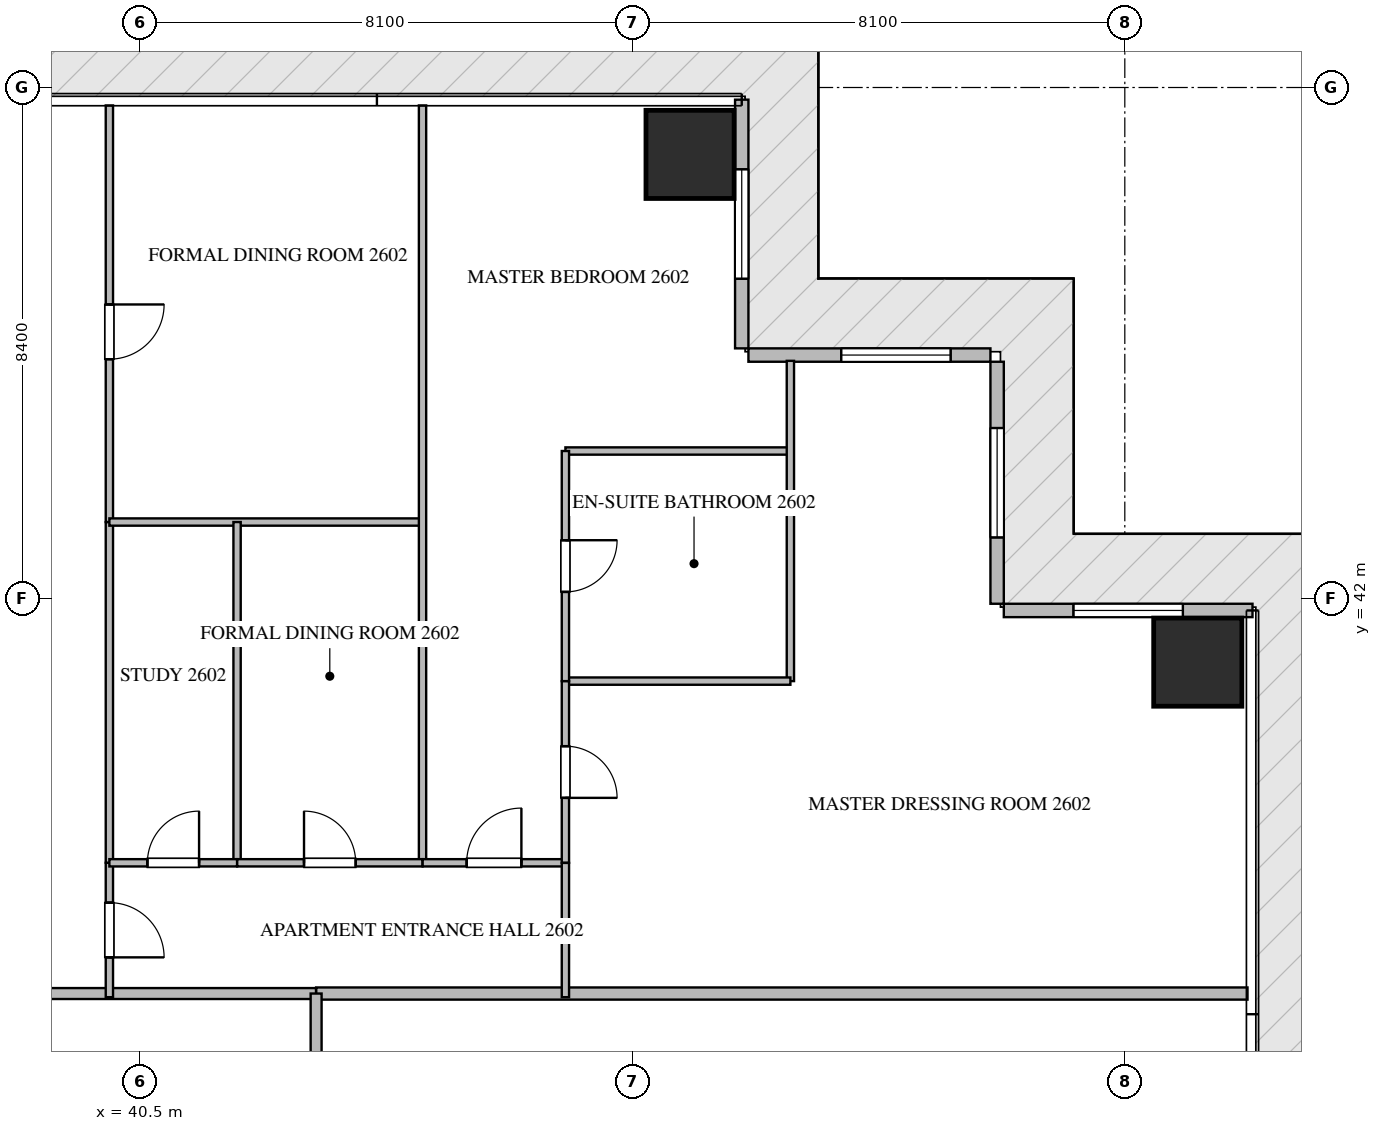
"""IFC4 building model, lengths in metres.
Left out: names, types, materials, properties, quantities, classifications, styles, units other than length and angle.
Written with IfcOpenShell. Run it as: python <this file> out.ifc"""

import sys

from ifc_helpers import new_model, si_unit, direction, frame, frame_2d, origin, origin_2d, place, context, subcontext, project, spatial, rectangle, extrude, source, transform, mapped, element, fill, save


model = new_model("IFC4")
c1 = context("Model", 3, precision=1e-05, world=origin(), true_north=direction((0.0, 1.0)))
c2 = subcontext(c1, "Body", "Model", "MODEL_VIEW")
j1 = project(units=[si_unit("LENGTHUNIT", "METRE"), si_unit("PLANEANGLEUNIT", "RADIAN")], contexts=[c1])
p1 = place(None, origin())
s1 = spatial("IfcSite", under=j1, at=p1, CompositionType="ELEMENT")
p2 = place(p1, origin())
s2 = spatial("IfcBuilding", under=s1, at=p2, CompositionType="ELEMENT")
p3 = place(p2, frame((0.0, 0.0, 105.45)))
s3 = spatial("IfcBuildingStorey", under=s2, at=p3, CompositionType="ELEMENT", Elevation=105.45)
m1 = source(origin(), c2, "Body", "SweptSolid", [
    extrude(rectangle(XDim=1.45, YDim=1.45, at=origin_2d()), origin(), (0.0, 0.0, 1.0), 3.65),
])
for number, where, z_axis, x_axis in (
    (1, (49.55, 49.3, -0.26), (0.0, 0.0, 1.0), (1.0, 0.0, 0.0)),
    (2, (57.9, 40.95, -0.26), (0.0, 0.0, 1.0), (1.0, 0.0, 0.0)),
):
    element("IfcColumn", number, at=place(p3, frame(where, z_axis=z_axis, x_axis=x_axis)), inside=s3, PredefinedType="COLUMN", context=c2, shape_type="MappedRepresentation", body=[
        mapped(m1, transform((0.0, 0.0, 0.0), scale=1.0)),
    ])
p4 = place(p3, frame((58.8, 41.8, 0.0), z_axis=(0.0, 0.0, 1.0), x_axis=(-1.0, 0.0, 0.0)))
e3 = element("IfcWall", 3, at=p4, inside=s3, PredefinedType="ELEMENTEDWALL", context=c2, shape_type="SweptSolid", body=[
    extrude(rectangle(XDim=4.09, YDim=0.22, at=frame_2d((2.045, 0.0))), origin(), (0.0, 0.0, 1.0), 3.375),
])
p5 = place(p4, frame((1.145, 0.0, 0.65)))
e4 = element("IfcOpeningElement", 4, at=p5, cuts=e3, PredefinedType="OPENING", context=c2, shape_type="SweptSolid", body=[
    extrude(rectangle(XDim=1.8, YDim=2.1, at=frame_2d((0.9, 1.05))), frame((0.0, 0.12, 0.0), z_axis=(0.0, -1.0, 0.0), x_axis=(1.0, 0.0, 0.0)), (0.0, 0.0, 1.0), 0.24),
])
p6 = place(p3, frame((54.6, 41.91, 0.0), z_axis=(0.0, 0.0, 1.0), x_axis=(0.0, 1.0, 0.0)))
e5 = element("IfcWall", 5, at=p6, inside=s3, PredefinedType="ELEMENTEDWALL", context=c2, shape_type="SweptSolid", body=[
    extrude(rectangle(XDim=3.98, YDim=0.22, at=frame_2d((1.99, 0.0))), origin(), (0.0, 0.0, 1.0), 3.375),
])
p7 = place(p6, frame((1.09, 0.0, 0.65)))
e6 = element("IfcOpeningElement", 6, at=p7, cuts=e5, PredefinedType="OPENING", context=c2, shape_type="SweptSolid", body=[
    extrude(rectangle(XDim=1.8, YDim=2.1, at=frame_2d((0.9, 1.05))), frame((0.0, 0.12, 0.0), z_axis=(0.0, -1.0, 0.0), x_axis=(1.0, 0.0, 0.0)), (0.0, 0.0, 1.0), 0.24),
])
p8 = place(p3, frame((54.49, 46.0, 0.0), z_axis=(0.0, 0.0, 1.0), x_axis=(-1.0, 0.0, 0.0)))
e7 = element("IfcWall", 7, at=p8, inside=s3, PredefinedType="ELEMENTEDWALL", context=c2, shape_type="SweptSolid", body=[
    extrude(rectangle(XDim=3.98, YDim=0.22, at=frame_2d((1.99, 0.0))), origin(), (0.0, 0.0, 1.0), 3.375),
])
p9 = place(p8, frame((0.654, 0.0, 0.65)))
e8 = element("IfcOpeningElement", 8, at=p9, cuts=e7, PredefinedType="OPENING", context=c2, shape_type="SweptSolid", body=[
    extrude(rectangle(XDim=1.8, YDim=2.1, at=frame_2d((0.9, 1.05))), frame((0.0, 0.12, 0.0), z_axis=(0.0, -1.0, 0.0), x_axis=(1.0, 0.0, 0.0)), (0.0, 0.0, 1.0), 0.24),
])
p10 = place(p3, frame((50.4, 46.11, 0.0), z_axis=(0.0, 0.0, 1.0), x_axis=(0.0, 1.0, 0.0)))
e9 = element("IfcWall", 9, at=p10, inside=s3, PredefinedType="ELEMENTEDWALL", context=c2, shape_type="SweptSolid", body=[
    extrude(rectangle(XDim=4.09, YDim=0.22, at=frame_2d((2.045, 0.0))), origin(), (0.0, 0.0, 1.0), 3.375),
])
p11 = place(p10, frame((1.145, 0.0, 0.65)))
e10 = element("IfcOpeningElement", 10, at=p11, cuts=e9, PredefinedType="OPENING", context=c2, shape_type="SweptSolid", body=[
    extrude(rectangle(XDim=1.8, YDim=2.1, at=frame_2d((0.9, 1.05))), frame((0.0, 0.12, 0.0), z_axis=(0.0, -1.0, 0.0), x_axis=(1.0, 0.0, 0.0)), (0.0, 0.0, 1.0), 0.24),
])
p12 = place(p3, frame((43.4, 35.5, 0.0), z_axis=(0.0, 0.0, 1.0), x_axis=(1.0, 0.0, 0.0)))
e11 = element("IfcWall", 11, at=p12, inside=s3, PredefinedType="PARTITIONING", context=c2, shape_type="SweptSolid", body=[
    extrude(rectangle(XDim=15.318, YDim=0.2, at=frame_2d((7.659, 0.0))), origin(), (0.0, 0.0, 1.0), 3.39),
])
p13 = place(p3, frame((21.402, 35.5, 0.0), z_axis=(0.0, 0.0, 1.0), x_axis=(1.0, 0.0, 0.0)))
e12 = element("IfcWall", 12, at=p13, inside=s3, PredefinedType="PARTITIONING", context=c2, shape_type="SweptSolid", body=[
    extrude(rectangle(XDim=21.996, YDim=0.18, at=frame_2d((10.998, 0.0))), origin(), (0.0, 0.0, 1.0), 3.39),
])
p14 = place(p13, frame((15.222, 0.0, 0.0)))
e13 = element("IfcOpeningElement", 13, at=p14, cuts=e12, PredefinedType="OPENING", context=c2, shape_type="SweptSolid", body=[
    extrude(rectangle(XDim=1.0, YDim=2.15, at=frame_2d((0.5, 1.075))), frame((0.0, 0.1, 0.0), z_axis=(0.0, -1.0, 0.0), x_axis=(1.0, 0.0, 0.0)), (0.0, 0.0, 1.0), 0.2),
])
p15 = place(p3, frame((43.4, 14.9, 0.0), z_axis=(0.0, 0.0, 1.0), x_axis=(0.0, 1.0, 0.0)))
e14 = element("IfcWall", 14, at=p15, inside=s3, PredefinedType="PARTITIONING", context=c2, shape_type="SweptSolid", body=[
    extrude(rectangle(XDim=20.6, YDim=0.18, at=frame_2d((10.3, 0.0))), origin(), (0.0, 0.0, 1.0), 3.39),
])
p16 = place(p15, frame((1.82, 0.0, 0.0)))
e15 = element("IfcOpeningElement", 15, at=p16, cuts=e14, PredefinedType="OPENING", context=c2, shape_type="SweptSolid", body=[
    extrude(rectangle(XDim=1.0, YDim=2.15, at=frame_2d((0.5, 1.075))), frame((0.0, 0.1, 0.0), z_axis=(0.0, -1.0, 0.0), x_axis=(1.0, 0.0, 0.0)), (0.0, 0.0, 1.0), 0.2),
])
p17 = place(p15, frame((11.27, 0.0, 0.0)))
e16 = element("IfcOpeningElement", 16, at=p17, cuts=e14, PredefinedType="OPENING", context=c2, shape_type="SweptSolid", body=[
    extrude(rectangle(XDim=1.0, YDim=2.15, at=frame_2d((0.5, 1.075))), frame((0.0, 0.1, 0.0), z_axis=(0.0, -1.0, 0.0), x_axis=(1.0, 0.0, 0.0)), (0.0, 0.0, 1.0), 0.2),
])
p18 = place(p15, frame((17.92, 0.0, 0.0)))
e17 = element("IfcOpeningElement", 17, at=p18, cuts=e14, PredefinedType="OPENING", context=c2, shape_type="SweptSolid", body=[
    extrude(rectangle(XDim=1.0, YDim=2.15, at=frame_2d((0.5, 1.075))), frame((0.0, 0.1, 0.0), z_axis=(0.0, -1.0, 0.0), x_axis=(1.0, 0.0, 0.0)), (0.0, 0.0, 1.0), 0.2),
])
p19 = place(p3, frame((40.0, 37.65, 0.0), z_axis=(0.0, 0.0, 1.0), x_axis=(0.0, -1.0, 0.0)))
e18 = element("IfcWall", 18, at=p19, inside=s3, PredefinedType="PARTITIONING", context=c2, shape_type="SweptSolid", body=[
    extrude(rectangle(XDim=2.21, YDim=0.12, at=frame_2d((1.105, 0.0))), origin(), (0.0, 0.0, 1.0), 3.39),
])
p20 = place(p19, frame((0.655, 0.0, 0.0)))
e19 = element("IfcOpeningElement", 19, at=p20, cuts=e18, PredefinedType="OPENING", context=c2, shape_type="SweptSolid", body=[
    extrude(rectangle(XDim=0.9, YDim=2.1, at=frame_2d((0.45, 1.05))), frame((0.0, 0.07, 0.0), z_axis=(0.0, -1.0, 0.0), x_axis=(1.0, 0.0, 0.0)), (0.0, 0.0, 1.0), 0.14),
])
p21 = place(p3, frame((40.0, 50.105, 0.0), z_axis=(0.0, 0.0, 1.0), x_axis=(0.0, -1.0, 0.0)))
e20 = element("IfcWall", 20, at=p21, inside=s3, PredefinedType="PARTITIONING", context=c2, shape_type="SweptSolid", body=[
    extrude(rectangle(XDim=6.851, YDim=0.12, at=frame_2d((3.426, 0.0))), origin(), (0.0, 0.0, 1.0), 3.39),
])
p22 = place(p21, frame((3.273, 0.0, 0.0)))
e21 = element("IfcOpeningElement", 21, at=p22, cuts=e20, PredefinedType="OPENING", context=c2, shape_type="SweptSolid", body=[
    extrude(rectangle(XDim=0.9, YDim=2.1, at=frame_2d((0.45, 1.05))), frame((0.0, 0.07, 0.0), z_axis=(0.0, -1.0, 0.0), x_axis=(1.0, 0.0, 0.0)), (0.0, 0.0, 1.0), 0.14),
])
p23 = place(p3, frame((40.0, 43.252, 0.0), z_axis=(0.0, 0.0, 1.0), x_axis=(0.0, -1.0, 0.0)))
e22 = element("IfcWall", 22, at=p23, inside=s3, PredefinedType="PARTITIONING", context=c2, shape_type="SweptSolid", body=[
    extrude(rectangle(XDim=5.6, YDim=0.12, at=frame_2d((2.8, 0.0))), origin(), (0.0, 0.0, 1.0), 3.39),
])
p24 = place(p3, frame((40.0, 43.254, 0.0), z_axis=(0.0, 0.0, 1.0), x_axis=(1.0, 0.0, 0.0)))
e23 = element("IfcWall", 23, at=p24, inside=s3, PredefinedType="PARTITIONING", context=c2, shape_type="SweptSolid", body=[
    extrude(rectangle(XDim=5.15, YDim=0.12, at=frame_2d((2.575, 0.0))), origin(), (0.0, 0.0, 1.0), 3.39),
])
p25 = place(p3, frame((45.15, 50.105, 0.0), z_axis=(0.0, 0.0, 1.0), x_axis=(0.0, -1.0, 0.0)))
e24 = element("IfcWall", 24, at=p25, inside=s3, PredefinedType="PARTITIONING", context=c2, shape_type="SweptSolid", body=[
    extrude(rectangle(XDim=12.455, YDim=0.12, at=frame_2d((6.228, 0.0))), origin(), (0.0, 0.0, 1.0), 3.39),
])
p26 = place(p3, frame((42.1, 43.254, 0.0), z_axis=(0.0, 0.0, 1.0), x_axis=(0.0, -1.0, 0.0)))
e25 = element("IfcWall", 25, at=p26, inside=s3, PredefinedType="PARTITIONING", context=c2, shape_type="SweptSolid", body=[
    extrude(rectangle(XDim=5.604, YDim=0.12, at=frame_2d((2.802, 0.0))), origin(), (0.0, 0.0, 1.0), 3.39),
])
p27 = place(p3, frame((40.0, 37.65, 0.0), z_axis=(0.0, 0.0, 1.0), x_axis=(1.0, 0.0, 0.0)))
e26 = element("IfcWall", 26, at=p27, inside=s3, PredefinedType="PARTITIONING", context=c2, shape_type="SweptSolid", body=[
    extrude(rectangle(XDim=2.1, YDim=0.12, at=frame_2d((1.05, 0.0))), origin(), (0.0, 0.0, 1.0), 3.39),
])
p28 = place(p27, frame((0.625, 0.0, 0.0)))
e27 = element("IfcOpeningElement", 27, at=p28, cuts=e26, PredefinedType="OPENING", context=c2, shape_type="SweptSolid", body=[
    extrude(rectangle(XDim=0.85, YDim=2.1, at=frame_2d((0.425, 1.05))), frame((0.0, 0.07, 0.0), z_axis=(0.0, -1.0, 0.0), x_axis=(1.0, 0.0, 0.0)), (0.0, 0.0, 1.0), 0.14),
])
p29 = place(p3, frame((42.102, 37.65, 0.0), z_axis=(0.0, 0.0, 1.0), x_axis=(1.0, 0.0, 0.0)))
e28 = element("IfcWall", 28, at=p29, inside=s3, PredefinedType="PARTITIONING", context=c2, shape_type="SweptSolid", body=[
    extrude(rectangle(XDim=3.048, YDim=0.12, at=frame_2d((1.524, 0.0))), origin(), (0.0, 0.0, 1.0), 3.39),
])
p30 = place(p29, frame((1.099, 0.0, 0.0)))
e29 = element("IfcOpeningElement", 29, at=p30, cuts=e28, PredefinedType="OPENING", context=c2, shape_type="SweptSolid", body=[
    extrude(rectangle(XDim=0.85, YDim=2.1, at=frame_2d((0.425, 1.05))), frame((0.0, 0.07, 0.0), z_axis=(0.0, -1.0, 0.0), x_axis=(1.0, 0.0, 0.0)), (0.0, 0.0, 1.0), 0.14),
])
p31 = place(p3, frame((45.152, 37.65, 0.0), z_axis=(0.0, 0.0, 1.0), x_axis=(1.0, 0.0, 0.0)))
e30 = element("IfcWall", 30, at=p31, inside=s3, PredefinedType="PARTITIONING", context=c2, shape_type="SweptSolid", body=[
    extrude(rectangle(XDim=2.348, YDim=0.12, at=frame_2d((1.174, 0.0))), origin(), (0.0, 0.0, 1.0), 3.39),
])
p32 = place(p31, frame((0.724, 0.0, 0.0)))
e31 = element("IfcOpeningElement", 31, at=p32, cuts=e30, PredefinedType="OPENING", context=c2, shape_type="SweptSolid", body=[
    extrude(rectangle(XDim=0.9, YDim=2.1, at=frame_2d((0.45, 1.05))), frame((0.0, 0.07, 0.0), z_axis=(0.0, -1.0, 0.0), x_axis=(1.0, 0.0, 0.0)), (0.0, 0.0, 1.0), 0.14),
])
p33 = place(p3, frame((47.5, 44.422, 0.0), z_axis=(0.0, 0.0, 1.0), x_axis=(1.0, 0.0, 0.0)))
e32 = element("IfcWall", 32, at=p33, inside=s3, PredefinedType="PARTITIONING", context=c2, shape_type="SweptSolid", body=[
    extrude(rectangle(XDim=3.7, YDim=0.12, at=frame_2d((1.85, 0.0))), origin(), (0.0, 0.0, 1.0), 3.39),
])
p34 = place(p3, frame((51.2, 45.905, 0.0), z_axis=(0.0, 0.0, 1.0), x_axis=(0.0, -1.0, 0.0)))
e33 = element("IfcWall", 33, at=p34, inside=s3, PredefinedType="PARTITIONING", context=c2, shape_type="SweptSolid", body=[
    extrude(rectangle(XDim=5.267, YDim=0.12, at=frame_2d((2.634, 0.0))), origin(), (0.0, 0.0, 1.0), 3.39),
])
p35 = place(p3, frame((47.5, 40.638, 0.0), z_axis=(0.0, 0.0, 1.0), x_axis=(1.0, 0.0, 0.0)))
e34 = element("IfcWall", 34, at=p35, inside=s3, PredefinedType="PARTITIONING", context=c2, shape_type="SweptSolid", body=[
    extrude(rectangle(XDim=3.7, YDim=0.12, at=frame_2d((1.85, 0.0))), origin(), (0.0, 0.0, 1.0), 3.39),
])
p36 = place(p3, frame((47.5, 44.422, 0.0), z_axis=(0.0, 0.0, 1.0), x_axis=(0.0, -1.0, 0.0)))
e35 = element("IfcWall", 35, at=p36, inside=s3, PredefinedType="PARTITIONING", context=c2, shape_type="SweptSolid", body=[
    extrude(rectangle(XDim=3.784, YDim=0.12, at=frame_2d((1.892, 0.0))), origin(), (0.0, 0.0, 1.0), 3.39),
])
p37 = place(p36, frame((1.467, 0.0, 0.0)))
e36 = element("IfcOpeningElement", 36, at=p37, cuts=e35, PredefinedType="OPENING", context=c2, shape_type="SweptSolid", body=[
    extrude(rectangle(XDim=0.85, YDim=2.1, at=frame_2d((0.425, 1.05))), frame((0.0, 0.07, 0.0), z_axis=(0.0, -1.0, 0.0), x_axis=(1.0, 0.0, 0.0)), (0.0, 0.0, 1.0), 0.14),
])
p38 = place(p3, frame((47.5, 40.636, 0.0), z_axis=(0.0, 0.0, 1.0), x_axis=(0.0, -1.0, 0.0)))
e37 = element("IfcWall", 37, at=p38, inside=s3, PredefinedType="PARTITIONING", context=c2, shape_type="SweptSolid", body=[
    extrude(rectangle(XDim=2.986, YDim=0.12, at=frame_2d((1.493, 0.0))), origin(), (0.0, 0.0, 1.0), 3.39),
])
p39 = place(p38, frame((1.068, 0.0, 0.0)))
e38 = element("IfcOpeningElement", 38, at=p39, cuts=e37, PredefinedType="OPENING", context=c2, shape_type="SweptSolid", body=[
    extrude(rectangle(XDim=0.85, YDim=2.1, at=frame_2d((0.425, 1.05))), frame((0.0, 0.07, 0.0), z_axis=(0.0, -1.0, 0.0), x_axis=(1.0, 0.0, 0.0)), (0.0, 0.0, 1.0), 0.14),
])
p40 = place(p3, frame((47.5, 37.648, 0.0), z_axis=(0.0, 0.0, 1.0), x_axis=(0.0, -1.0, 0.0)))
e39 = element("IfcWall", 39, at=p40, inside=s3, PredefinedType="PARTITIONING", context=c2, shape_type="SweptSolid", body=[
    extrude(rectangle(XDim=2.208, YDim=0.12, at=frame_2d((1.104, 0.0))), origin(), (0.0, 0.0, 1.0), 3.39),
])
m2 = source(origin(), c2, "Body", "SweptSolid", [
    extrude(rectangle(XDim=1.8, YDim=2.1, at=frame_2d((0.9, 1.05))), frame((0.0, 0.03, 0.0), z_axis=(0.0, -1.0, 0.0), x_axis=(1.0, 0.0, 0.0)), (0.0, 0.0, 1.0), 0.06),
])
p41 = place(p5, origin())
e40 = element("IfcWindow", 40, at=p41, inside=s3, PartitioningType="SINGLE_PANEL", PredefinedType="WINDOW", context=c2, shape_type="MappedRepresentation", body=[
    mapped(m2, transform((0.0, 0.0, 0.0), scale=1.0)),
])
fill(e4, e40)
p42 = place(p7, origin())
e41 = element("IfcWindow", 41, at=p42, inside=s3, PartitioningType="SINGLE_PANEL", PredefinedType="WINDOW", context=c2, shape_type="MappedRepresentation", body=[
    mapped(m2, transform((0.0, 0.0, 0.0), scale=1.0)),
])
fill(e6, e41)
p43 = place(p9, origin())
e42 = element("IfcWindow", 42, at=p43, inside=s3, PartitioningType="SINGLE_PANEL", PredefinedType="WINDOW", context=c2, shape_type="MappedRepresentation", body=[
    mapped(m2, transform((0.0, 0.0, 0.0), scale=1.0)),
])
fill(e8, e42)
p44 = place(p11, origin())
e43 = element("IfcWindow", 43, at=p44, inside=s3, PartitioningType="SINGLE_PANEL", PredefinedType="WINDOW", context=c2, shape_type="MappedRepresentation", body=[
    mapped(m2, transform((0.0, 0.0, 0.0), scale=1.0)),
])
fill(e10, e43)
m3 = source(origin(), c2, "Body", "SweptSolid", [
    extrude(rectangle(XDim=0.9, YDim=2.1, at=frame_2d((0.45, 1.05))), frame((0.0, 0.025, 0.0), z_axis=(0.0, -1.0, 0.0), x_axis=(1.0, 0.0, 0.0)), (0.0, 0.0, 1.0), 0.05),
])
p45 = place(p20, origin())
e44 = element("IfcDoor", 44, at=p45, inside=s3, OperationType="SINGLE_SWING_RIGHT", PredefinedType="DOOR", context=c2, shape_type="MappedRepresentation", body=[
    mapped(m3, transform((0.0, 0.0, 0.0), scale=1.0)),
])
fill(e19, e44)
p46 = place(p22, origin())
e45 = element("IfcDoor", 45, at=p46, inside=s3, OperationType="SINGLE_SWING_LEFT", PredefinedType="DOOR", context=c2, shape_type="MappedRepresentation", body=[
    mapped(m3, transform((0.0, 0.0, 0.0), scale=1.0)),
])
fill(e21, e45)
m4 = source(origin(), c2, "Body", "SweptSolid", [
    extrude(rectangle(XDim=0.85, YDim=2.1, at=frame_2d((0.425, 1.05))), frame((0.0, 0.025, 0.0), z_axis=(0.0, -1.0, 0.0), x_axis=(1.0, 0.0, 0.0)), (0.0, 0.0, 1.0), 0.05),
])
p47 = place(p28, origin())
e46 = element("IfcDoor", 46, at=p47, inside=s3, OperationType="SINGLE_SWING_RIGHT", PredefinedType="DOOR", context=c2, shape_type="MappedRepresentation", body=[
    mapped(m4, transform((0.0, 0.0, 0.0), scale=1.0)),
])
fill(e27, e46)
p48 = place(p30, origin())
e47 = element("IfcDoor", 47, at=p48, inside=s3, OperationType="SINGLE_SWING_LEFT", PredefinedType="DOOR", context=c2, shape_type="MappedRepresentation", body=[
    mapped(m4, transform((0.0, 0.0, 0.0), scale=1.0)),
])
fill(e29, e47)
p49 = place(p32, origin())
e48 = element("IfcDoor", 48, at=p49, inside=s3, OperationType="SINGLE_SWING_RIGHT", PredefinedType="DOOR", context=c2, shape_type="MappedRepresentation", body=[
    mapped(m3, transform((0.0, 0.0, 0.0), scale=1.0)),
])
fill(e31, e48)
p50 = place(p37, origin())
e49 = element("IfcDoor", 49, at=p50, inside=s3, OperationType="SINGLE_SWING_LEFT", PredefinedType="DOOR", context=c2, shape_type="MappedRepresentation", body=[
    mapped(m4, transform((0.0, 0.0, 0.0), scale=1.0)),
])
fill(e36, e49)
p51 = place(p39, origin())
e50 = element("IfcDoor", 50, at=p51, inside=s3, OperationType="SINGLE_SWING_RIGHT", PredefinedType="DOOR", context=c2, shape_type="MappedRepresentation", body=[
    mapped(m4, transform((0.0, 0.0, 0.0), scale=1.0)),
])
fill(e38, e50)
save(model, sys.argv[1])
